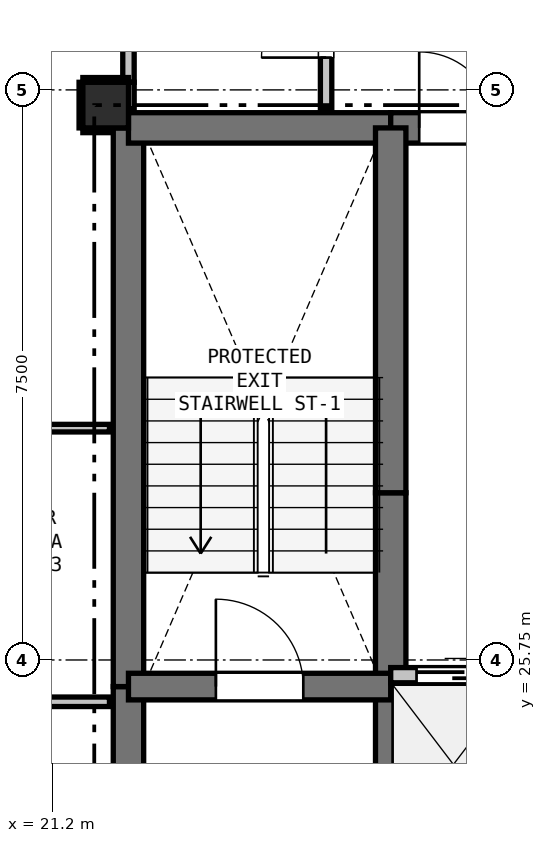
"""IFC4 building model, lengths in metres.
Left out: names, types, materials, properties, quantities, classifications, styles, units other than length and angle.
Written with IfcOpenShell. Run it as: python <this file> out.ifc"""

import sys

from ifc_helpers import new_model, si_unit, direction, frame, frame_2d, origin, origin_2d, place, context, subcontext, project, spatial, rectangle, extrude, element, fill, save


model = new_model("IFC4")
c1 = context("Model", 3, precision=1e-05, world=origin(), true_north=direction((0.0, 1.0)))
c2 = subcontext(c1, "Body", "Model", "MODEL_VIEW")
j1 = project(units=[si_unit("LENGTHUNIT", "METRE"), si_unit("PLANEANGLEUNIT", "RADIAN")], contexts=[c1])
p1 = place(None, origin())
s1 = spatial("IfcSite", under=j1, at=p1, CompositionType="ELEMENT")
p2 = place(p1, origin())
s2 = spatial("IfcBuilding", under=s1, at=p2, CompositionType="ELEMENT")
p3 = place(p2, frame((0.0, 0.0, 233.1)))
s3 = spatial("IfcBuildingStorey", under=s2, at=p3, CompositionType="ELEMENT", Elevation=233.1)
p4 = place(p3, frame((21.9, 33.05, 0.0), z_axis=(0.0, 0.0, 1.0), x_axis=(1.0, 0.0, 0.0)))
e1 = element("IfcColumn", 1, at=p4, inside=s3, PredefinedType="COLUMN", context=c2, shape_type="SweptSolid", body=[
    extrude(rectangle(XDim=0.6, YDim=0.6, at=origin_2d()), origin(), (0.0, 0.0, 1.0), 3.3),
])
p5 = place(p3, frame((22.2, 20.75, 0.0), z_axis=(0.0, 0.0, 1.0), x_axis=(0.0, 1.0, 0.0)))
e2 = element("IfcWall", 2, at=p5, inside=s3, PredefinedType="SHEAR", context=c2, shape_type="SweptSolid", body=[
    extrude(rectangle(XDim=4.65, YDim=0.4, at=frame_2d((2.325, 0.0))), origin(), (0.0, 0.0, 1.0), 3.08),
])
p6 = place(p3, frame((22.2, 25.4, 0.0), z_axis=(0.0, 0.0, 1.0), x_axis=(0.0, 1.0, 0.0)))
e3 = element("IfcWall", 3, at=p6, inside=s3, PredefinedType="SHEAR", context=c2, shape_type="SweptSolid", body=[
    extrude(rectangle(XDim=7.35, YDim=0.4, at=frame_2d((3.675, 0.0))), origin(), (0.0, 0.0, 1.0), 3.08),
])
p7 = place(p3, frame((22.2, 32.75, 0.0), z_axis=(0.0, 0.0, 1.0), x_axis=(1.0, 0.0, 0.0)))
e4 = element("IfcWall", 4, at=p7, inside=s3, PredefinedType="SHEAR", context=c2, shape_type="SweptSolid", body=[
    extrude(rectangle(XDim=3.45, YDim=0.4, at=frame_2d((1.725, 0.0))), origin(), (0.0, 0.0, 1.0), 3.08),
])
p8 = place(p3, frame((25.65, 32.75, 0.0), z_axis=(0.0, 0.0, 1.0), x_axis=(1.0, 0.0, 0.0)))
e5 = element("IfcWall", 5, at=p8, inside=s3, PredefinedType="SHEAR", context=c2, shape_type="SweptSolid", body=[
    extrude(rectangle(XDim=1.75, YDim=0.4, at=frame_2d((0.875, 0.0))), origin(), (0.0, 0.0, 1.0), 3.08),
])
p9 = place(p8, frame((0.375, 0.0, 0.0)))
e6 = element("IfcOpeningElement", 6, at=p9, cuts=e5, PredefinedType="OPENING", context=c2, shape_type="SweptSolid", body=[
    extrude(rectangle(XDim=1.0, YDim=2.15, at=frame_2d((0.5, 1.075))), frame((0.0, 0.21, 0.0), z_axis=(0.0, -1.0, 0.0), x_axis=(1.0, 0.0, 0.0)), (0.0, 0.0, 1.0), 0.42),
])
p10 = place(p3, frame((25.65, 22.75, 0.0), z_axis=(0.0, 0.0, 1.0), x_axis=(0.0, 1.0, 0.0)))
e7 = element("IfcWall", 7, at=p10, inside=s3, PredefinedType="SHEAR", context=c2, shape_type="SweptSolid", body=[
    extrude(rectangle(XDim=2.8, YDim=0.4, at=frame_2d((1.4, 0.0))), origin(), (0.0, 0.0, 1.0), 3.08),
])
p11 = place(p3, frame((25.65, 25.55, 0.0), z_axis=(0.0, 0.0, 1.0), x_axis=(0.0, 1.0, 0.0)))
e8 = element("IfcWall", 8, at=p11, inside=s3, PredefinedType="SHEAR", context=c2, shape_type="SweptSolid", body=[
    extrude(rectangle(XDim=2.4, YDim=0.4, at=frame_2d((1.2, 0.0))), origin(), (0.0, 0.0, 1.0), 3.08),
])
p12 = place(p3, frame((25.65, 27.95, 0.0), z_axis=(0.0, 0.0, 1.0), x_axis=(0.0, 1.0, 0.0)))
e9 = element("IfcWall", 9, at=p12, inside=s3, PredefinedType="SHEAR", context=c2, shape_type="SweptSolid", body=[
    extrude(rectangle(XDim=4.8, YDim=0.4, at=frame_2d((2.4, 0.0))), origin(), (0.0, 0.0, 1.0), 3.08),
])
p13 = place(p3, frame((22.2, 25.4, 0.0), z_axis=(0.0, 0.0, 1.0), x_axis=(1.0, 0.0, 0.0)))
e10 = element("IfcWall", 10, at=p13, inside=s3, PredefinedType="SHEAR", context=c2, shape_type="SweptSolid", body=[
    extrude(rectangle(XDim=3.45, YDim=0.35, at=frame_2d((1.725, 0.0))), origin(), (0.0, 0.0, 1.0), 3.08),
])
p14 = place(p13, frame((1.15, 0.0, 0.0)))
e11 = element("IfcOpeningElement", 11, at=p14, cuts=e10, PredefinedType="OPENING", context=c2, shape_type="SweptSolid", body=[
    extrude(rectangle(XDim=1.15, YDim=2.15, at=frame_2d((0.575, 1.075))), frame((0.0, 0.185, 0.0), z_axis=(0.0, -1.0, 0.0), x_axis=(1.0, 0.0, 0.0)), (0.0, 0.0, 1.0), 0.37),
])
p15 = place(p3, frame((25.65, 25.55, 0.0), z_axis=(0.0, 0.0, 1.0), x_axis=(1.0, 0.0, 0.0)))
e12 = element("IfcWall", 12, at=p15, inside=s3, PredefinedType="PARTITIONING", context=c2, shape_type="SweptSolid", body=[
    extrude(rectangle(XDim=4.95, YDim=0.2, at=frame_2d((2.475, 0.0))), origin(), (0.0, 0.0, 1.0), 3.08),
])
p16 = place(p15, frame((0.34, 0.0, 0.0)))
e13 = element("IfcOpeningElement", 13, at=p16, cuts=e12, PredefinedType="OPENING", context=c2, shape_type="SweptSolid", body=[
    extrude(rectangle(XDim=1.1, YDim=2.15, at=frame_2d((0.55, 1.075))), frame((0.0, 0.11, 0.0), z_axis=(0.0, -1.0, 0.0), x_axis=(1.0, 0.0, 0.0)), (0.0, 0.0, 1.0), 0.22),
])
p17 = place(p15, frame((1.99, 0.0, 0.0)))
e14 = element("IfcOpeningElement", 14, at=p17, cuts=e12, PredefinedType="OPENING", context=c2, shape_type="SweptSolid", body=[
    extrude(rectangle(XDim=1.1, YDim=2.15, at=frame_2d((0.55, 1.075))), frame((0.0, 0.11, 0.0), z_axis=(0.0, -1.0, 0.0), x_axis=(1.0, 0.0, 0.0)), (0.0, 0.0, 1.0), 0.22),
])
p18 = place(p15, frame((3.64, 0.0, 0.0)))
e15 = element("IfcOpeningElement", 15, at=p18, cuts=e12, PredefinedType="OPENING", context=c2, shape_type="SweptSolid", body=[
    extrude(rectangle(XDim=1.1, YDim=2.15, at=frame_2d((0.55, 1.075))), frame((0.0, 0.11, 0.0), z_axis=(0.0, -1.0, 0.0), x_axis=(1.0, 0.0, 0.0)), (0.0, 0.0, 1.0), 0.22),
])
p19 = place(p3, frame((24.8, 33.0, 0.0), z_axis=(0.0, 0.0, 1.0), x_axis=(0.0, 1.0, 0.0)))
e16 = element("IfcWall", 16, at=p19, inside=s3, PredefinedType="PARTITIONING", context=c2, shape_type="SweptSolid", body=[
    extrude(rectangle(XDim=2.2, YDim=0.15, at=frame_2d((1.1, 0.0))), origin(), (0.0, 0.0, 1.0), 2.605),
])
p20 = place(p19, frame((0.675, 0.0, 0.0)))
e17 = element("IfcOpeningElement", 17, at=p20, cuts=e16, PredefinedType="OPENING", context=c2, shape_type="SweptSolid", body=[
    extrude(rectangle(XDim=0.85, YDim=2.1, at=frame_2d((0.425, 1.05))), frame((0.0, 0.085, 0.0), z_axis=(0.0, -1.0, 0.0), x_axis=(1.0, 0.0, 0.0)), (0.0, 0.0, 1.0), 0.17),
])
p21 = place(p3, frame((16.8, 25.2, 0.0), z_axis=(0.0, 0.0, 1.0), x_axis=(1.0, 0.0, 0.0)))
e18 = element("IfcWall", 18, at=p21, inside=s3, PredefinedType="PARTITIONING", context=c2, shape_type="SweptSolid", body=[
    extrude(rectangle(XDim=5.15, YDim=0.125, at=frame_2d((2.575, 0.0))), origin(), (0.0, 0.0, 1.0), 2.605),
])
p22 = place(p21, frame((2.125, 0.0, 0.0)))
e19 = element("IfcOpeningElement", 19, at=p22, cuts=e18, PredefinedType="OPENING", context=c2, shape_type="SweptSolid", body=[
    extrude(rectangle(XDim=0.9, YDim=2.1, at=frame_2d((0.45, 1.05))), frame((0.0, 0.073, 0.0), z_axis=(0.0, -1.0, 0.0), x_axis=(1.0, 0.0, 0.0)), (0.0, 0.0, 1.0), 0.145),
])
p23 = place(p3, frame((22.2, 33.0, 0.0), z_axis=(0.0, 0.0, 1.0), x_axis=(0.0, 1.0, 0.0)))
e20 = element("IfcWall", 20, at=p23, inside=s3, PredefinedType="PARTITIONING", context=c2, shape_type="SweptSolid", body=[
    extrude(rectangle(XDim=0.35, YDim=0.15, at=frame_2d((0.175, 0.0))), origin(), (0.0, 0.0, 1.0), 2.605),
])
p24 = place(p3, frame((22.2, 33.35, 0.0), z_axis=(0.0, 0.0, 1.0), x_axis=(0.0, 1.0, 0.0)))
e21 = element("IfcWall", 21, at=p24, inside=s3, PredefinedType="PARTITIONING", context=c2, shape_type="SweptSolid", body=[
    extrude(rectangle(XDim=1.833, YDim=0.15, at=frame_2d((0.916, 0.0))), origin(), (0.0, 0.0, 1.0), 2.365),
])
p25 = place(p24, frame((0.491, 0.0, 0.0)))
e22 = element("IfcOpeningElement", 22, at=p25, cuts=e21, PredefinedType="OPENING", context=c2, shape_type="SweptSolid", body=[
    extrude(rectangle(XDim=0.85, YDim=2.1, at=frame_2d((0.425, 1.05))), frame((0.0, 0.085, 0.0), z_axis=(0.0, -1.0, 0.0), x_axis=(1.0, 0.0, 0.0)), (0.0, 0.0, 1.0), 0.17),
])
p26 = place(p3, frame((22.2, 33.35, 0.0), z_axis=(0.0, 0.0, 1.0), x_axis=(-1.0, 0.0, 0.0)))
e23 = element("IfcWall", 23, at=p26, inside=s3, PredefinedType="PARTITIONING", context=c2, shape_type="SweptSolid", body=[
    extrude(rectangle(XDim=0.6, YDim=0.125, at=frame_2d((0.3, 0.0))), origin(), (0.0, 0.0, 1.0), 3.08),
])
p27 = place(p3, frame((21.6, 33.35, 0.0), z_axis=(0.0, 0.0, 1.0), x_axis=(0.0, -1.0, 0.0)))
e24 = element("IfcWall", 24, at=p27, inside=s3, PredefinedType="PARTITIONING", context=c2, shape_type="SweptSolid", body=[
    extrude(rectangle(XDim=0.6, YDim=0.1, at=frame_2d((0.3, 0.0))), origin(), (0.0, 0.0, 1.0), 2.528),
])
p28 = place(p3, frame((21.6, 32.75, 0.0), z_axis=(0.0, 0.0, 1.0), x_axis=(1.0, 0.0, 0.0)))
e25 = element("IfcWall", 25, at=p28, inside=s3, PredefinedType="PARTITIONING", context=c2, shape_type="SweptSolid", body=[
    extrude(rectangle(XDim=0.35, YDim=0.125, at=frame_2d((0.175, 0.0))), origin(), (0.0, 0.0, 1.0), 2.605),
])
p29 = place(p3, frame((21.95, 28.8, 0.0), z_axis=(0.0, 0.0, 1.0), x_axis=(-1.0, 0.0, 0.0)))
e26 = element("IfcWall", 26, at=p29, inside=s3, PredefinedType="PARTITIONING", context=c2, shape_type="SweptSolid", body=[
    extrude(rectangle(XDim=5.15, YDim=0.1, at=frame_2d((2.575, 0.0))), origin(), (0.0, 0.0, 1.0), 2.605),
])
p30 = place(p16, origin())
e27 = element("IfcDoor", 27, at=p30, inside=s3, OperationType="SLIDING_TO_LEFT", PredefinedType="DOOR", context=c2, shape_type="SweptSolid", body=[
    extrude(rectangle(XDim=1.1, YDim=2.15, at=frame_2d((0.55, 1.075))), frame((0.0, 0.025, 0.0), z_axis=(0.0, -1.0, 0.0), x_axis=(1.0, 0.0, 0.0)), (0.0, 0.0, 1.0), 0.05),
])
fill(e13, e27)
p31 = place(p9, origin())
e28 = element("IfcDoor", 28, at=p31, inside=s3, OperationType="SINGLE_SWING_LEFT", PredefinedType="DOOR", context=c2, shape_type="SweptSolid", body=[
    extrude(rectangle(XDim=1.0, YDim=2.15, at=frame_2d((0.5, 1.075))), frame((0.0, 0.025, 0.0), z_axis=(0.0, -1.0, 0.0), x_axis=(1.0, 0.0, 0.0)), (0.0, 0.0, 1.0), 0.05),
])
fill(e6, e28)
p32 = place(p14, origin())
e29 = element("IfcDoor", 29, at=p32, inside=s3, OperationType="SINGLE_SWING_LEFT", PredefinedType="DOOR", context=c2, shape_type="SweptSolid", body=[
    extrude(rectangle(XDim=1.15, YDim=2.15, at=frame_2d((0.575, 1.075))), frame((0.0, 0.025, 0.0), z_axis=(0.0, -1.0, 0.0), x_axis=(1.0, 0.0, 0.0)), (0.0, 0.0, 1.0), 0.05),
])
fill(e11, e29)
p33 = place(p20, origin())
e30 = element("IfcDoor", 30, at=p33, inside=s3, OperationType="SINGLE_SWING_LEFT", PredefinedType="DOOR", context=c2, shape_type="SweptSolid", body=[
    extrude(rectangle(XDim=0.85, YDim=2.1, at=frame_2d((0.425, 1.05))), frame((0.0, 0.025, 0.0), z_axis=(0.0, -1.0, 0.0), x_axis=(1.0, 0.0, 0.0)), (0.0, 0.0, 1.0), 0.05),
])
fill(e17, e30)
save(model, sys.argv[1])
